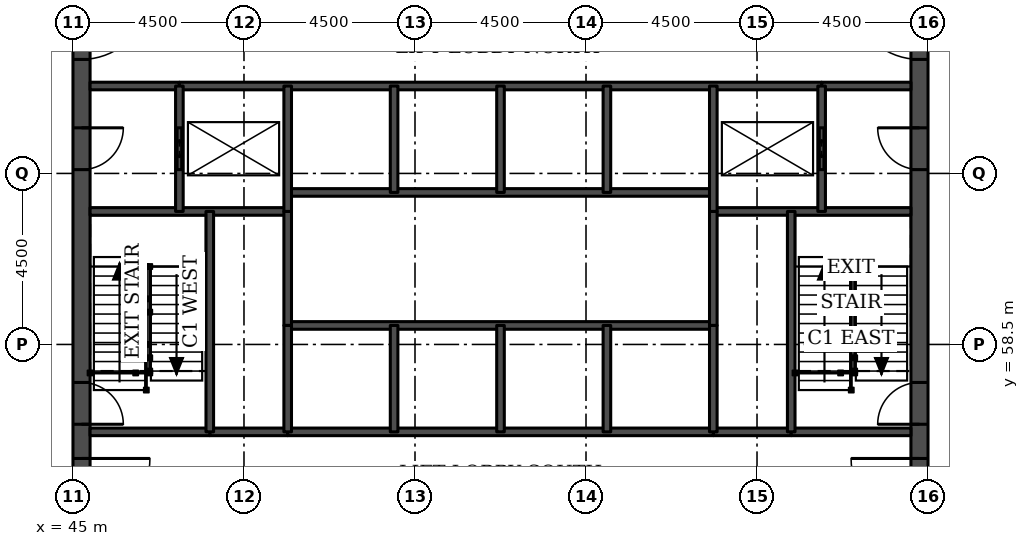
"""IFC4 building model, lengths in metres.
Left out: names, types, materials, properties, quantities, classifications, styles, units other than length and angle.
Written with IfcOpenShell. Run it as: python <this file> out.ifc"""

import sys

from ifc_helpers import new_model, si_unit, direction, frame, frame_2d, origin, place, context, subcontext, project, spatial, rectangle, extrude, element, fill, save


model = new_model("IFC4")
c1 = context("Model", 3, precision=1e-05, world=origin(), true_north=direction((0.0, 1.0)))
c2 = subcontext(c1, "Body", "Model", "MODEL_VIEW")
j1 = project(units=[si_unit("LENGTHUNIT", "METRE"), si_unit("PLANEANGLEUNIT", "RADIAN")], contexts=[c1])
p1 = place(None, origin())
s1 = spatial("IfcSite", under=j1, at=p1, CompositionType="ELEMENT")
p2 = place(p1, origin())
s2 = spatial("IfcBuilding", under=s1, at=p2, CompositionType="ELEMENT")
p3 = place(p2, frame((0.0, 0.0, 82.6)))
s3 = spatial("IfcBuildingStorey", under=s2, at=p3, CompositionType="ELEMENT", Elevation=82.6)
p4 = place(p3, frame((45.225, 49.5, 0.0), z_axis=(0.0, 0.0, 1.0), x_axis=(0.0, 1.0, 0.0)))
e1 = element("IfcWall", 1, at=p4, inside=s3, PredefinedType="SHEAR", context=c2, shape_type="SweptSolid", body=[
    extrude(rectangle(XDim=22.5, YDim=0.45, at=frame_2d((11.25, 0.0))), origin(), (0.0, 0.0, 1.0), 3.7),
])
p5 = place(p4, frame((4.2, 0.0, 0.0)))
e2 = element("IfcOpeningElement", 2, at=p5, cuts=e1, PredefinedType="OPENING", context=c2, shape_type="SweptSolid", body=[
    extrude(rectangle(XDim=1.8, YDim=2.1, at=frame_2d((0.9, 1.05))), frame((0.0, 0.235, 0.0), z_axis=(0.0, -1.0, 0.0), x_axis=(1.0, 0.0, 0.0)), (0.0, 0.0, 1.0), 0.47),
])
p6 = place(p4, frame((6.9, 0.0, 0.0)))
e3 = element("IfcOpeningElement", 3, at=p6, cuts=e1, PredefinedType="OPENING", context=c2, shape_type="SweptSolid", body=[
    extrude(rectangle(XDim=1.1, YDim=2.1, at=frame_2d((0.55, 1.05))), frame((0.0, 0.235, 0.0), z_axis=(0.0, -1.0, 0.0), x_axis=(1.0, 0.0, 0.0)), (0.0, 0.0, 1.0), 0.47),
])
p7 = place(p4, frame((13.6, 0.0, 0.0)))
e4 = element("IfcOpeningElement", 4, at=p7, cuts=e1, PredefinedType="OPENING", context=c2, shape_type="SweptSolid", body=[
    extrude(rectangle(XDim=1.1, YDim=2.1, at=frame_2d((0.55, 1.05))), frame((0.0, 0.235, 0.0), z_axis=(0.0, -1.0, 0.0), x_axis=(1.0, 0.0, 0.0)), (0.0, 0.0, 1.0), 0.47),
])
p8 = place(p4, frame((16.5, 0.0, 0.0)))
e5 = element("IfcOpeningElement", 5, at=p8, cuts=e1, PredefinedType="OPENING", context=c2, shape_type="SweptSolid", body=[
    extrude(rectangle(XDim=1.8, YDim=2.1, at=frame_2d((0.9, 1.05))), frame((0.0, 0.235, 0.0), z_axis=(0.0, -1.0, 0.0), x_axis=(1.0, 0.0, 0.0)), (0.0, 0.0, 1.0), 0.47),
])
p9 = place(p3, frame((67.275, 49.5, 0.0), z_axis=(0.0, 0.0, 1.0), x_axis=(0.0, 1.0, 0.0)))
e6 = element("IfcWall", 6, at=p9, inside=s3, PredefinedType="SHEAR", context=c2, shape_type="SweptSolid", body=[
    extrude(rectangle(XDim=22.5, YDim=0.45, at=frame_2d((11.25, 0.0))), origin(), (0.0, 0.0, 1.0), 3.7),
])
p10 = place(p9, frame((4.2, 0.0, 0.0)))
e7 = element("IfcOpeningElement", 7, at=p10, cuts=e6, PredefinedType="OPENING", context=c2, shape_type="SweptSolid", body=[
    extrude(rectangle(XDim=1.8, YDim=2.1, at=frame_2d((0.9, 1.05))), frame((0.0, 0.235, 0.0), z_axis=(0.0, -1.0, 0.0), x_axis=(1.0, 0.0, 0.0)), (0.0, 0.0, 1.0), 0.47),
])
p11 = place(p9, frame((6.9, 0.0, 0.0)))
e8 = element("IfcOpeningElement", 8, at=p11, cuts=e6, PredefinedType="OPENING", context=c2, shape_type="SweptSolid", body=[
    extrude(rectangle(XDim=1.1, YDim=2.1, at=frame_2d((0.55, 1.05))), frame((0.0, 0.235, 0.0), z_axis=(0.0, -1.0, 0.0), x_axis=(1.0, 0.0, 0.0)), (0.0, 0.0, 1.0), 0.47),
])
p12 = place(p9, frame((13.6, 0.0, 0.0)))
e9 = element("IfcOpeningElement", 9, at=p12, cuts=e6, PredefinedType="OPENING", context=c2, shape_type="SweptSolid", body=[
    extrude(rectangle(XDim=1.1, YDim=2.1, at=frame_2d((0.55, 1.05))), frame((0.0, 0.235, 0.0), z_axis=(0.0, -1.0, 0.0), x_axis=(1.0, 0.0, 0.0)), (0.0, 0.0, 1.0), 0.47),
])
p13 = place(p9, frame((16.5, 0.0, 0.0)))
e10 = element("IfcOpeningElement", 10, at=p13, cuts=e6, PredefinedType="OPENING", context=c2, shape_type="SweptSolid", body=[
    extrude(rectangle(XDim=1.8, YDim=2.1, at=frame_2d((0.9, 1.05))), frame((0.0, 0.235, 0.0), z_axis=(0.0, -1.0, 0.0), x_axis=(1.0, 0.0, 0.0)), (0.0, 0.0, 1.0), 0.47),
])
for number, where, z_axis, x_axis in (
    (11, (48.6, 56.2, 0.0), (0.0, 0.0, 1.0), (1.0, 0.0, 0.0)),
    (12, (61.85, 56.2, 0.0), (0.0, 0.0, 1.0), (1.0, 0.0, 0.0)),
):
    element("IfcWall", number, at=place(p3, frame(where, z_axis=z_axis, x_axis=x_axis)), inside=s3, PredefinedType="SOLIDWALL", context=c2, shape_type="SweptSolid", body=[
        extrude(rectangle(XDim=2.05, YDim=0.2, at=frame_2d((1.025, 0.0))), origin(), (0.0, 0.0, 1.0), 3.55),
    ])
p14 = place(p3, frame((45.45, 56.2, 0.0), z_axis=(0.0, 0.0, 1.0), x_axis=(1.0, 0.0, 0.0)))
e13 = element("IfcWall", 13, at=p14, inside=s3, PredefinedType="SOLIDWALL", context=c2, shape_type="SweptSolid", body=[
    extrude(rectangle(XDim=3.15, YDim=0.2, at=frame_2d((1.575, 0.0))), origin(), (0.0, 0.0, 1.0), 3.55),
])
p15 = place(p3, frame((50.65, 56.2, 0.0), z_axis=(0.0, 0.0, 1.0), x_axis=(1.0, 0.0, 0.0)))
e14 = element("IfcWall", 14, at=p15, inside=s3, PredefinedType="SOLIDWALL", context=c2, shape_type="SweptSolid", body=[
    extrude(rectangle(XDim=11.2, YDim=0.2, at=frame_2d((5.6, 0.0))), origin(), (0.0, 0.0, 1.0), 3.55),
])
p16 = place(p3, frame((63.9, 56.2, 0.0), z_axis=(0.0, 0.0, 1.0), x_axis=(1.0, 0.0, 0.0)))
e15 = element("IfcWall", 15, at=p16, inside=s3, PredefinedType="SOLIDWALL", context=c2, shape_type="SweptSolid", body=[
    extrude(rectangle(XDim=3.15, YDim=0.2, at=frame_2d((1.575, 0.0))), origin(), (0.0, 0.0, 1.0), 3.55),
])
p17 = place(p3, frame((50.65, 59.0, 0.0), z_axis=(0.0, 0.0, 1.0), x_axis=(1.0, 0.0, 0.0)))
e16 = element("IfcWall", 16, at=p17, inside=s3, PredefinedType="SOLIDWALL", context=c2, shape_type="SweptSolid", body=[
    extrude(rectangle(XDim=11.2, YDim=0.2, at=frame_2d((5.6, 0.0))), origin(), (0.0, 0.0, 1.0), 3.7),
])
for number, where, z_axis, x_axis in (
    (17, (45.45, 62.0, 0.0), (0.0, 0.0, 1.0), (1.0, 0.0, 0.0)),
    (18, (61.85, 62.0, 0.0), (0.0, 0.0, 1.0), (1.0, 0.0, 0.0)),
):
    element("IfcWall", number, at=place(p3, frame(where, z_axis=z_axis, x_axis=x_axis)), inside=s3, PredefinedType="SOLIDWALL", context=c2, shape_type="SweptSolid", body=[
        extrude(rectangle(XDim=5.2, YDim=0.2, at=frame_2d((2.6, 0.0))), origin(), (0.0, 0.0, 1.0), 3.55),
    ])
p18 = place(p3, frame((50.65, 62.5, 0.0), z_axis=(0.0, 0.0, 1.0), x_axis=(1.0, 0.0, 0.0)))
e19 = element("IfcWall", 19, at=p18, inside=s3, PredefinedType="SOLIDWALL", context=c2, shape_type="SweptSolid", body=[
    extrude(rectangle(XDim=11.2, YDim=0.2, at=frame_2d((5.6, 0.0))), origin(), (0.0, 0.0, 1.0), 3.7),
])
for number, where, z_axis, x_axis in (
    (20, (45.45, 65.3, 0.0), (0.0, 0.0, 1.0), (1.0, 0.0, 0.0)),
    (21, (64.7, 65.3, 0.0), (0.0, 0.0, 1.0), (1.0, 0.0, 0.0)),
):
    element("IfcWall", number, at=place(p3, frame(where, z_axis=z_axis, x_axis=x_axis)), inside=s3, PredefinedType="SOLIDWALL", context=c2, shape_type="SweptSolid", body=[
        extrude(rectangle(XDim=2.35, YDim=0.2, at=frame_2d((1.175, 0.0))), origin(), (0.0, 0.0, 1.0), 3.55),
    ])
p19 = place(p3, frame((47.8, 65.3, 0.0), z_axis=(0.0, 0.0, 1.0), x_axis=(1.0, 0.0, 0.0)))
e22 = element("IfcWall", 22, at=p19, inside=s3, PredefinedType="SOLIDWALL", context=c2, shape_type="SweptSolid", body=[
    extrude(rectangle(XDim=16.9, YDim=0.2, at=frame_2d((8.45, 0.0))), origin(), (0.0, 0.0, 1.0), 3.55),
])
p20 = place(p3, frame((47.8, 62.0, 0.0), z_axis=(0.0, 0.0, 1.0), x_axis=(0.0, 1.0, 0.0)))
e23 = element("IfcWall", 23, at=p20, inside=s3, PredefinedType="SOLIDWALL", context=c2, shape_type="SweptSolid", body=[
    extrude(rectangle(XDim=3.3, YDim=0.2, at=frame_2d((1.65, 0.0))), origin(), (0.0, 0.0, 1.0), 3.55),
])
p21 = place(p20, frame((1.1, 0.0, 0.0)))
e24 = element("IfcOpeningElement", 24, at=p21, cuts=e23, PredefinedType="OPENING", context=c2, shape_type="SweptSolid", body=[
    extrude(rectangle(XDim=1.1, YDim=2.1, at=frame_2d((0.55, 1.05))), frame((0.0, 0.11, 0.0), z_axis=(0.0, -1.0, 0.0), x_axis=(1.0, 0.0, 0.0)), (0.0, 0.0, 1.0), 0.22),
])
p22 = place(p3, frame((48.6, 56.2, 0.0), z_axis=(0.0, 0.0, 1.0), x_axis=(0.0, 1.0, 0.0)))
e25 = element("IfcWall", 25, at=p22, inside=s3, PredefinedType="SOLIDWALL", context=c2, shape_type="SweptSolid", body=[
    extrude(rectangle(XDim=5.8, YDim=0.2, at=frame_2d((2.9, 0.0))), origin(), (0.0, 0.0, 1.0), 3.55),
])
p23 = place(p3, frame((50.65, 59.0, 0.0), z_axis=(0.0, 0.0, 1.0), x_axis=(0.0, 1.0, 0.0)))
e26 = element("IfcWall", 26, at=p23, inside=s3, PredefinedType="SOLIDWALL", context=c2, shape_type="SweptSolid", body=[
    extrude(rectangle(XDim=3.0, YDim=0.2, at=frame_2d((1.5, 0.0))), origin(), (0.0, 0.0, 1.0), 3.7),
])
p24 = place(p3, frame((50.65, 56.2, 0.0), z_axis=(0.0, 0.0, 1.0), x_axis=(0.0, 1.0, 0.0)))
e27 = element("IfcWall", 27, at=p24, inside=s3, PredefinedType="SOLIDWALL", context=c2, shape_type="SweptSolid", body=[
    extrude(rectangle(XDim=2.8, YDim=0.2, at=frame_2d((1.4, 0.0))), origin(), (0.0, 0.0, 1.0), 3.55),
])
p25 = place(p3, frame((50.65, 62.0, 0.0), z_axis=(0.0, 0.0, 1.0), x_axis=(0.0, 1.0, 0.0)))
e28 = element("IfcWall", 28, at=p25, inside=s3, PredefinedType="SOLIDWALL", context=c2, shape_type="SweptSolid", body=[
    extrude(rectangle(XDim=3.3, YDim=0.2, at=frame_2d((1.65, 0.0))), origin(), (0.0, 0.0, 1.0), 3.55),
])
for number, where, z_axis, x_axis in (
    (29, (53.45, 56.2, 0.0), (0.0, 0.0, 1.0), (0.0, 1.0, 0.0)),
    (30, (53.45, 62.5, 0.0), (0.0, 0.0, 1.0), (0.0, 1.0, 0.0)),
    (31, (56.25, 56.2, 0.0), (0.0, 0.0, 1.0), (0.0, 1.0, 0.0)),
    (32, (56.25, 62.5, 0.0), (0.0, 0.0, 1.0), (0.0, 1.0, 0.0)),
    (33, (59.05, 56.2, 0.0), (0.0, 0.0, 1.0), (0.0, 1.0, 0.0)),
    (34, (59.05, 62.5, 0.0), (0.0, 0.0, 1.0), (0.0, 1.0, 0.0)),
):
    element("IfcWall", number, at=place(p3, frame(where, z_axis=z_axis, x_axis=x_axis)), inside=s3, PredefinedType="SOLIDWALL", context=c2, shape_type="SweptSolid", body=[
        extrude(rectangle(XDim=2.8, YDim=0.2, at=frame_2d((1.4, 0.0))), origin(), (0.0, 0.0, 1.0), 3.55),
    ])
p26 = place(p3, frame((61.85, 59.0, 0.0), z_axis=(0.0, 0.0, 1.0), x_axis=(0.0, 1.0, 0.0)))
e35 = element("IfcWall", 35, at=p26, inside=s3, PredefinedType="SOLIDWALL", context=c2, shape_type="SweptSolid", body=[
    extrude(rectangle(XDim=3.0, YDim=0.2, at=frame_2d((1.5, 0.0))), origin(), (0.0, 0.0, 1.0), 3.7),
])
p27 = place(p3, frame((61.85, 56.2, 0.0), z_axis=(0.0, 0.0, 1.0), x_axis=(0.0, 1.0, 0.0)))
e36 = element("IfcWall", 36, at=p27, inside=s3, PredefinedType="SOLIDWALL", context=c2, shape_type="SweptSolid", body=[
    extrude(rectangle(XDim=2.8, YDim=0.2, at=frame_2d((1.4, 0.0))), origin(), (0.0, 0.0, 1.0), 3.55),
])
p28 = place(p3, frame((61.85, 62.0, 0.0), z_axis=(0.0, 0.0, 1.0), x_axis=(0.0, 1.0, 0.0)))
e37 = element("IfcWall", 37, at=p28, inside=s3, PredefinedType="SOLIDWALL", context=c2, shape_type="SweptSolid", body=[
    extrude(rectangle(XDim=3.3, YDim=0.2, at=frame_2d((1.65, 0.0))), origin(), (0.0, 0.0, 1.0), 3.55),
])
p29 = place(p3, frame((63.9, 56.2, 0.0), z_axis=(0.0, 0.0, 1.0), x_axis=(0.0, 1.0, 0.0)))
e38 = element("IfcWall", 38, at=p29, inside=s3, PredefinedType="SOLIDWALL", context=c2, shape_type="SweptSolid", body=[
    extrude(rectangle(XDim=5.8, YDim=0.2, at=frame_2d((2.9, 0.0))), origin(), (0.0, 0.0, 1.0), 3.55),
])
p30 = place(p3, frame((64.7, 62.0, 0.0), z_axis=(0.0, 0.0, 1.0), x_axis=(0.0, 1.0, 0.0)))
e39 = element("IfcWall", 39, at=p30, inside=s3, PredefinedType="SOLIDWALL", context=c2, shape_type="SweptSolid", body=[
    extrude(rectangle(XDim=3.3, YDim=0.2, at=frame_2d((1.65, 0.0))), origin(), (0.0, 0.0, 1.0), 3.55),
])
p31 = place(p30, frame((1.1, 0.0, 0.0)))
e40 = element("IfcOpeningElement", 40, at=p31, cuts=e39, PredefinedType="OPENING", context=c2, shape_type="SweptSolid", body=[
    extrude(rectangle(XDim=1.1, YDim=2.1, at=frame_2d((0.55, 1.05))), frame((0.0, 0.11, 0.0), z_axis=(0.0, -1.0, 0.0), x_axis=(1.0, 0.0, 0.0)), (0.0, 0.0, 1.0), 0.22),
])
p32 = place(p21, origin())
e41 = element("IfcDoor", 41, at=p32, inside=s3, OperationType="DOUBLE_DOOR_SLIDING", PredefinedType="DOOR", context=c2, shape_type="SweptSolid", body=[
    extrude(rectangle(XDim=1.1, YDim=2.1, at=frame_2d((0.55, 1.05))), frame((0.0, 0.025, 0.0), z_axis=(0.0, -1.0, 0.0), x_axis=(1.0, 0.0, 0.0)), (0.0, 0.0, 1.0), 0.05),
])
fill(e24, e41)
p33 = place(p31, origin())
e42 = element("IfcDoor", 42, at=p33, inside=s3, OperationType="DOUBLE_DOOR_SLIDING", PredefinedType="DOOR", context=c2, shape_type="SweptSolid", body=[
    extrude(rectangle(XDim=1.1, YDim=2.1, at=frame_2d((0.55, 1.05))), frame((0.0, 0.025, 0.0), z_axis=(0.0, -1.0, 0.0), x_axis=(1.0, 0.0, 0.0)), (0.0, 0.0, 1.0), 0.05),
])
fill(e40, e42)
p34 = place(p5, frame((1.8, 0.0, 0.0), z_axis=(0.0, 0.0, 1.0), x_axis=(-1.0, 0.0, 0.0)))
e43 = element("IfcDoor", 43, at=p34, inside=s3, OperationType="SINGLE_SWING_LEFT", PredefinedType="DOOR", context=c2, shape_type="SweptSolid", body=[
    extrude(rectangle(XDim=1.8, YDim=2.1, at=frame_2d((0.9, 1.05))), frame((0.0, 0.025, 0.0), z_axis=(0.0, -1.0, 0.0), x_axis=(1.0, 0.0, 0.0)), (0.0, 0.0, 1.0), 0.05),
])
fill(e2, e43)
p35 = place(p6, frame((1.1, 0.0, 0.0), z_axis=(0.0, 0.0, 1.0), x_axis=(-1.0, 0.0, 0.0)))
e44 = element("IfcDoor", 44, at=p35, inside=s3, OperationType="SINGLE_SWING_RIGHT", PredefinedType="DOOR", context=c2, shape_type="SweptSolid", body=[
    extrude(rectangle(XDim=1.1, YDim=2.1, at=frame_2d((0.55, 1.05))), frame((0.0, 0.025, 0.0), z_axis=(0.0, -1.0, 0.0), x_axis=(1.0, 0.0, 0.0)), (0.0, 0.0, 1.0), 0.05),
])
fill(e3, e44)
p36 = place(p7, frame((1.1, 0.0, 0.0), z_axis=(0.0, 0.0, 1.0), x_axis=(-1.0, 0.0, 0.0)))
e45 = element("IfcDoor", 45, at=p36, inside=s3, OperationType="SINGLE_SWING_LEFT", PredefinedType="DOOR", context=c2, shape_type="SweptSolid", body=[
    extrude(rectangle(XDim=1.1, YDim=2.1, at=frame_2d((0.55, 1.05))), frame((0.0, 0.025, 0.0), z_axis=(0.0, -1.0, 0.0), x_axis=(1.0, 0.0, 0.0)), (0.0, 0.0, 1.0), 0.05),
])
fill(e4, e45)
p37 = place(p8, frame((1.8, 0.0, 0.0), z_axis=(0.0, 0.0, 1.0), x_axis=(-1.0, 0.0, 0.0)))
e46 = element("IfcDoor", 46, at=p37, inside=s3, OperationType="SINGLE_SWING_LEFT", PredefinedType="DOOR", context=c2, shape_type="SweptSolid", body=[
    extrude(rectangle(XDim=1.8, YDim=2.1, at=frame_2d((0.9, 1.05))), frame((0.0, 0.025, 0.0), z_axis=(0.0, -1.0, 0.0), x_axis=(1.0, 0.0, 0.0)), (0.0, 0.0, 1.0), 0.05),
])
fill(e5, e46)
p38 = place(p10, origin())
e47 = element("IfcDoor", 47, at=p38, inside=s3, OperationType="SINGLE_SWING_RIGHT", PredefinedType="DOOR", context=c2, shape_type="SweptSolid", body=[
    extrude(rectangle(XDim=1.8, YDim=2.1, at=frame_2d((0.9, 1.05))), frame((0.0, 0.025, 0.0), z_axis=(0.0, -1.0, 0.0), x_axis=(1.0, 0.0, 0.0)), (0.0, 0.0, 1.0), 0.05),
])
fill(e7, e47)
p39 = place(p11, origin())
e48 = element("IfcDoor", 48, at=p39, inside=s3, OperationType="SINGLE_SWING_LEFT", PredefinedType="DOOR", context=c2, shape_type="SweptSolid", body=[
    extrude(rectangle(XDim=1.1, YDim=2.1, at=frame_2d((0.55, 1.05))), frame((0.0, 0.025, 0.0), z_axis=(0.0, -1.0, 0.0), x_axis=(1.0, 0.0, 0.0)), (0.0, 0.0, 1.0), 0.05),
])
fill(e8, e48)
p40 = place(p12, origin())
e49 = element("IfcDoor", 49, at=p40, inside=s3, OperationType="SINGLE_SWING_RIGHT", PredefinedType="DOOR", context=c2, shape_type="SweptSolid", body=[
    extrude(rectangle(XDim=1.1, YDim=2.1, at=frame_2d((0.55, 1.05))), frame((0.0, 0.025, 0.0), z_axis=(0.0, -1.0, 0.0), x_axis=(1.0, 0.0, 0.0)), (0.0, 0.0, 1.0), 0.05),
])
fill(e9, e49)
p41 = place(p13, origin())
e50 = element("IfcDoor", 50, at=p41, inside=s3, OperationType="SINGLE_SWING_RIGHT", PredefinedType="DOOR", context=c2, shape_type="SweptSolid", body=[
    extrude(rectangle(XDim=1.8, YDim=2.1, at=frame_2d((0.9, 1.05))), frame((0.0, 0.025, 0.0), z_axis=(0.0, -1.0, 0.0), x_axis=(1.0, 0.0, 0.0)), (0.0, 0.0, 1.0), 0.05),
])
fill(e10, e50)
save(model, sys.argv[1])
